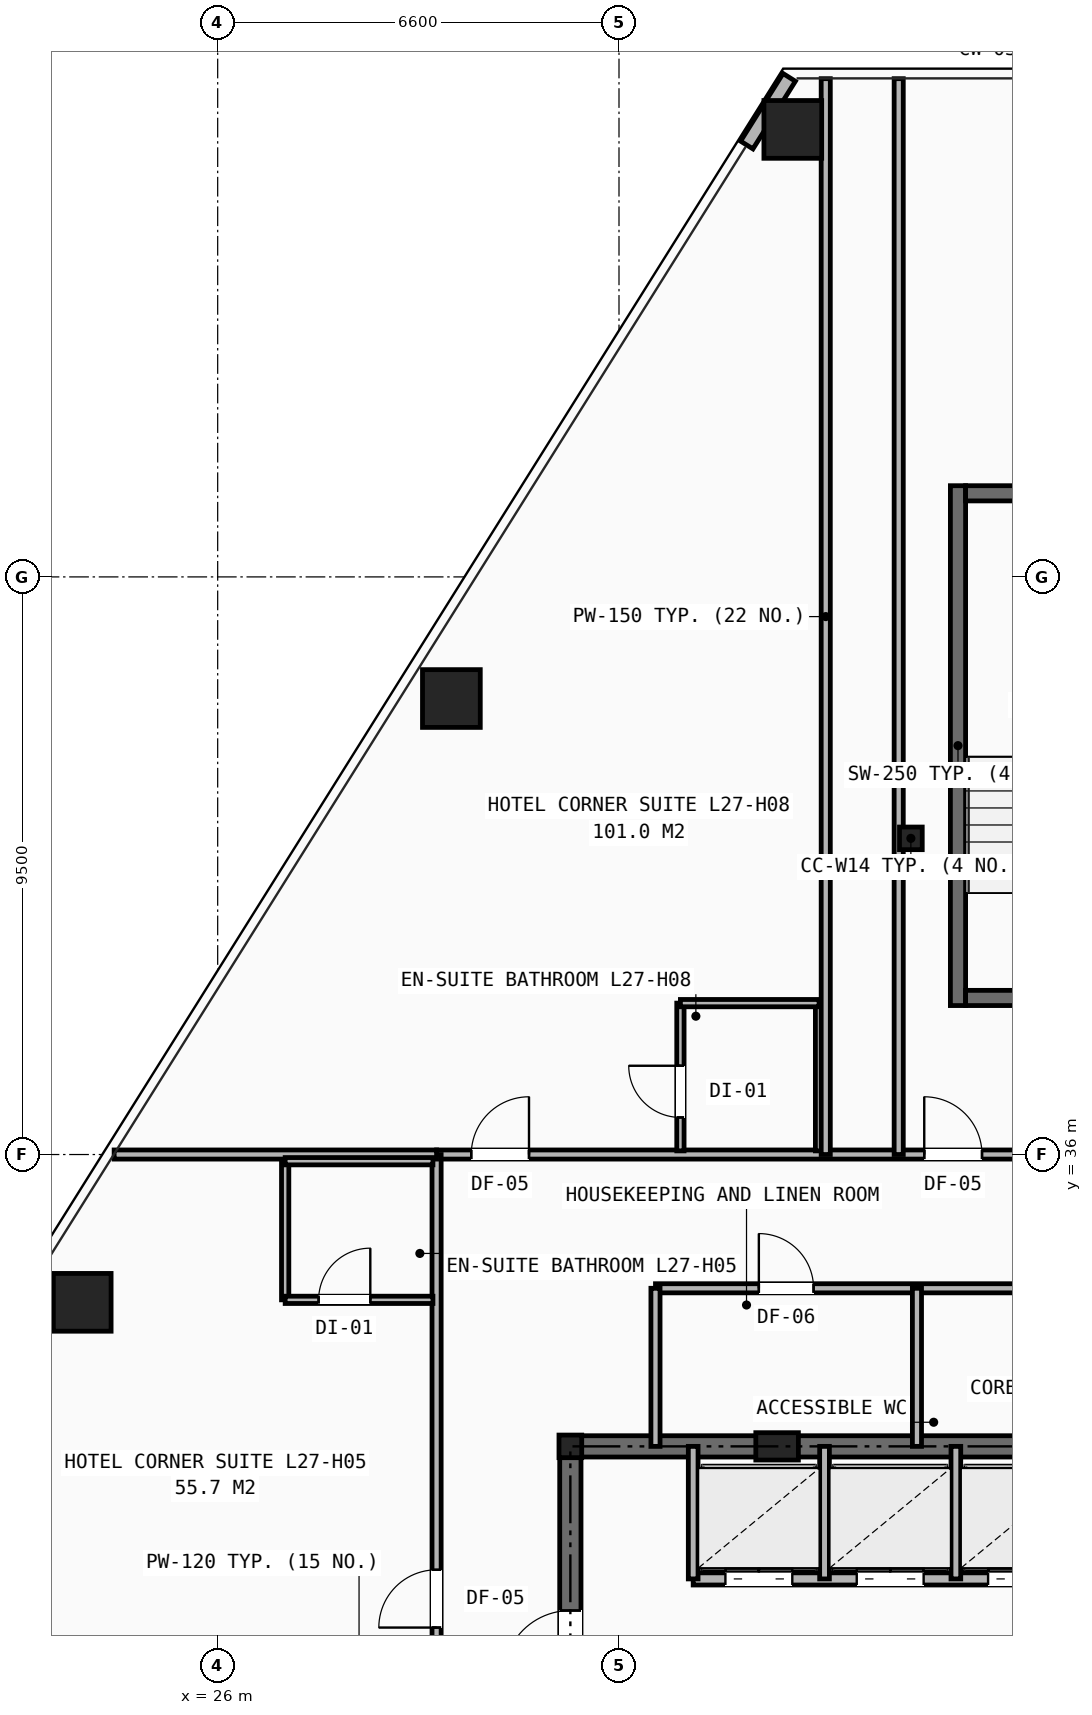
"""IFC4 building model, lengths in metres.
Left out: names, types, materials, properties, quantities, classifications, styles, units other than length and angle.
Written with IfcOpenShell. Run it as: python <this file> out.ifc"""

import sys

from ifc_helpers import new_model, si_unit, direction, frame, frame_2d, origin, origin_2d, place, context, subcontext, project, spatial, rectangle, hollow_rectangle, i_section, extrude, element, fill, save


model = new_model("IFC4")
c1 = context("Model", 3, precision=1e-05, world=origin(), true_north=direction((0.0, 1.0)))
c2 = subcontext(c1, "Body", "Model", "MODEL_VIEW")
j1 = project(units=[si_unit("LENGTHUNIT", "METRE"), si_unit("PLANEANGLEUNIT", "RADIAN")], contexts=[c1])
p1 = place(None, origin())
s1 = spatial("IfcSite", under=j1, at=p1, CompositionType="ELEMENT")
p2 = place(p1, origin())
s2 = spatial("IfcBuilding", under=s1, at=p2, CompositionType="ELEMENT")
p3 = place(p2, frame((0.0, 0.0, 95.8)))
s3 = spatial("IfcBuildingStorey", under=s2, at=p3, CompositionType="ELEMENT", Elevation=95.8)
for number, where, z_axis, x_axis in (
    (1, (31.8, 31.2, 0.0), (0.0, 0.0, 1.0), (1.0, 0.0, 0.0)),
    (2, (37.4, 41.2, 0.0), (0.0, 0.0, 1.0), (1.0, 0.0, 0.0)),
):
    element("IfcColumn", number, at=place(p3, frame(where, z_axis=z_axis, x_axis=x_axis)), inside=s3, PredefinedType="COLUMN", context=c2, shape_type="SweptSolid", body=[
        extrude(i_section(OverallWidth=0.374, OverallDepth=0.372, WebThickness=0.016, FlangeThickness=0.026, at=origin_2d()), origin(), (0.0, 0.0, 1.0), 3.2),
    ])
p4 = place(p3, frame((35.2, 31.2, 0.0), z_axis=(0.0, 0.0, 1.0), x_axis=(1.0, 0.0, 0.0)))
e3 = element("IfcColumn", 3, at=p4, inside=s3, PredefinedType="PILASTER", context=c2, shape_type="SweptSolid", body=[
    extrude(rectangle(XDim=0.7, YDim=0.45, at=origin_2d()), origin(), (0.0, 0.0, 1.0), 3.2),
])
for number, where, z_axis, x_axis in (
    (4, (35.458, 52.86, 0.0), (0.0, 0.0, 1.0), (1.0, 0.0, 0.0)),
    (5, (29.844, 43.5, 0.0), (0.0, 0.0, 1.0), (1.0, 0.0, 0.0)),
    (6, (23.772, 33.569, 0.0), (0.0, 0.0, 1.0), (1.0, 0.0, 0.0)),
):
    element("IfcColumn", number, at=place(p3, frame(where, z_axis=z_axis, x_axis=x_axis)), inside=s3, PredefinedType="COLUMN", context=c2, shape_type="SweptSolid", body=[
        extrude(hollow_rectangle(XDim=0.95, YDim=0.95, WallThickness=0.065, at=origin_2d()), origin(), (0.0, 0.0, 1.0), 3.2),
    ])
p5 = place(p3, frame((35.399, 53.716, 0.0), z_axis=(0.0, 0.0, 1.0), x_axis=(-0.531234768042, -0.847224658059, 0.0)))
e7 = element("IfcWall", 7, at=p5, inside=s3, PredefinedType="SHEAR", context=c2, shape_type="SweptSolid", body=[
    extrude(rectangle(XDim=1.313, YDim=0.24, at=frame_2d((0.657, 0.0))), origin(), (0.0, 0.0, 1.0), 2.253),
])
p6 = place(p3, frame((31.8, 31.2, 0.0), z_axis=(0.0, 0.0, 1.0), x_axis=(1.0, 0.0, 0.0)))
e8 = element("IfcWall", 8, at=p6, inside=s3, PredefinedType="SHEAR", context=c2, shape_type="SweptSolid", body=[
    extrude(rectangle(XDim=16.4, YDim=0.35, at=frame_2d((8.2, 0.0))), origin(), (0.0, 0.0, 1.0), 2.97),
])
p7 = place(p3, frame((31.8, 16.4, 0.0), z_axis=(0.0, 0.0, 1.0), x_axis=(0.0, 1.0, 0.0)))
e9 = element("IfcWall", 9, at=p7, inside=s3, PredefinedType="SHEAR", context=c2, shape_type="SweptSolid", body=[
    extrude(rectangle(XDim=14.8, YDim=0.35, at=frame_2d((7.4, 0.0))), origin(), (0.0, 0.0, 1.0), 2.97),
])
p8 = place(p7, frame((11.0, 0.0, 0.0)))
e10 = element("IfcOpeningElement", 10, at=p8, cuts=e9, PredefinedType="OPENING", context=c2, shape_type="SweptSolid", body=[
    extrude(rectangle(XDim=1.1, YDim=2.15, at=frame_2d((0.55, 1.075))), frame((0.0, 0.185, 0.0), z_axis=(0.0, -1.0, 0.0), x_axis=(1.0, 0.0, 0.0)), (0.0, 0.0, 1.0), 0.37),
])
p9 = place(p3, frame((33.82, 29.02, 0.0), z_axis=(0.0, 0.0, 1.0), x_axis=(1.0, 0.0, 0.0)))
e11 = element("IfcWall", 11, at=p9, inside=s3, PredefinedType="SOLIDWALL", context=c2, shape_type="SweptSolid", body=[
    extrude(rectangle(XDim=14.38, YDim=0.2, at=frame_2d((7.19, 0.0))), origin(), (0.0, 0.0, 1.0), 2.421),
])
p10 = place(p9, frame((0.53, 0.0, 0.0)))
e12 = element("IfcOpeningElement", 12, at=p10, cuts=e11, PredefinedType="OPENING", context=c2, shape_type="SweptSolid", body=[
    extrude(rectangle(XDim=1.1, YDim=2.15, at=frame_2d((0.55, 1.075))), frame((0.0, 0.11, 0.0), z_axis=(0.0, -1.0, 0.0), x_axis=(1.0, 0.0, 0.0)), (0.0, 0.0, 1.0), 0.22),
])
p11 = place(p9, frame((2.69, 0.0, 0.0)))
e13 = element("IfcOpeningElement", 13, at=p11, cuts=e11, PredefinedType="OPENING", context=c2, shape_type="SweptSolid", body=[
    extrude(rectangle(XDim=1.1, YDim=2.15, at=frame_2d((0.55, 1.075))), frame((0.0, 0.11, 0.0), z_axis=(0.0, -1.0, 0.0), x_axis=(1.0, 0.0, 0.0)), (0.0, 0.0, 1.0), 0.22),
])
p12 = place(p9, frame((4.85, 0.0, 0.0)))
e14 = element("IfcOpeningElement", 14, at=p12, cuts=e11, PredefinedType="OPENING", context=c2, shape_type="SweptSolid", body=[
    extrude(rectangle(XDim=1.1, YDim=2.15, at=frame_2d((0.55, 1.075))), frame((0.0, 0.11, 0.0), z_axis=(0.0, -1.0, 0.0), x_axis=(1.0, 0.0, 0.0)), (0.0, 0.0, 1.0), 0.22),
])
p13 = place(p9, frame((7.01, 0.0, 0.0)))
e15 = element("IfcOpeningElement", 15, at=p13, cuts=e11, PredefinedType="OPENING", context=c2, shape_type="SweptSolid", body=[
    extrude(rectangle(XDim=1.1, YDim=2.15, at=frame_2d((0.55, 1.075))), frame((0.0, 0.11, 0.0), z_axis=(0.0, -1.0, 0.0), x_axis=(1.0, 0.0, 0.0)), (0.0, 0.0, 1.0), 0.22),
])
for number, where, z_axis, x_axis in (
    (16, (33.82, 29.02, 0.0), (0.0, 0.0, 1.0), (0.0, 1.0, 0.0)),
    (17, (35.98, 29.02, 0.0), (0.0, 0.0, 1.0), (0.0, 1.0, 0.0)),
    (18, (38.14, 29.02, 0.0), (0.0, 0.0, 1.0), (0.0, 1.0, 0.0)),
):
    element("IfcWall", number, at=place(p3, frame(where, z_axis=z_axis, x_axis=x_axis)), inside=s3, PredefinedType="SOLIDWALL", context=c2, shape_type="SweptSolid", body=[
        extrude(rectangle(XDim=2.18, YDim=0.16, at=frame_2d((1.09, 0.0))), origin(), (0.0, 0.0, 1.0), 2.421),
    ])
p14 = place(p3, frame((33.2, 33.8, 0.0), z_axis=(0.0, 0.0, 1.0), x_axis=(1.0, 0.0, 0.0)))
e19 = element("IfcWall", 19, at=p14, inside=s3, PredefinedType="PARTITIONING", context=c2, shape_type="SweptSolid", body=[
    extrude(rectangle(XDim=13.0, YDim=0.15, at=frame_2d((6.5, 0.0))), origin(), (0.0, 0.0, 1.0), 2.97),
])
p15 = place(p14, frame((1.7, 0.0, 0.0)))
e20 = element("IfcOpeningElement", 20, at=p15, cuts=e19, PredefinedType="OPENING", context=c2, shape_type="SweptSolid", body=[
    extrude(rectangle(XDim=0.9, YDim=2.1, at=frame_2d((0.45, 1.05))), frame((0.0, 0.085, 0.0), z_axis=(0.0, -1.0, 0.0), x_axis=(1.0, 0.0, 0.0)), (0.0, 0.0, 1.0), 0.17),
])
p16 = place(p14, frame((6.0, 0.0, 0.0)))
e21 = element("IfcOpeningElement", 21, at=p16, cuts=e19, PredefinedType="OPENING", context=c2, shape_type="SweptSolid", body=[
    extrude(rectangle(XDim=0.9, YDim=2.1, at=frame_2d((0.45, 1.05))), frame((0.0, 0.085, 0.0), z_axis=(0.0, -1.0, 0.0), x_axis=(1.0, 0.0, 0.0)), (0.0, 0.0, 1.0), 0.17),
])
p17 = place(p14, frame((10.35, 0.0, 0.0)))
e22 = element("IfcOpeningElement", 22, at=p17, cuts=e19, PredefinedType="OPENING", context=c2, shape_type="SweptSolid", body=[
    extrude(rectangle(XDim=0.9, YDim=2.1, at=frame_2d((0.45, 1.05))), frame((0.0, 0.085, 0.0), z_axis=(0.0, -1.0, 0.0), x_axis=(1.0, 0.0, 0.0)), (0.0, 0.0, 1.0), 0.17),
])
for number, where, z_axis, x_axis in (
    (23, (33.2, 31.2, 0.0), (0.0, 0.0, 1.0), (0.0, 1.0, 0.0)),
    (24, (37.5, 31.2, 0.0), (0.0, 0.0, 1.0), (0.0, 1.0, 0.0)),
):
    element("IfcWall", number, at=place(p3, frame(where, z_axis=z_axis, x_axis=x_axis)), inside=s3, PredefinedType="PARTITIONING", context=c2, shape_type="SweptSolid", body=[
        extrude(rectangle(XDim=2.6, YDim=0.15, at=frame_2d((1.3, 0.0))), origin(), (0.0, 0.0, 1.0), 2.421),
    ])
p18 = place(p3, frame((29.6, 36.0, 0.0), z_axis=(0.0, 0.0, 1.0), x_axis=(1.0, 0.0, 0.0)))
e25 = element("IfcWall", 25, at=p18, inside=s3, PredefinedType="PARTITIONING", context=c2, shape_type="SweptSolid", body=[
    extrude(rectangle(XDim=9.65, YDim=0.15, at=frame_2d((4.825, 0.0))), origin(), (0.0, 0.0, 1.0), 2.503),
])
p19 = place(p18, frame((0.57, 0.0, 0.0)))
e26 = element("IfcOpeningElement", 26, at=p19, cuts=e25, PredefinedType="OPENING", context=c2, shape_type="SweptSolid", body=[
    extrude(rectangle(XDim=0.95, YDim=2.1, at=frame_2d((0.475, 1.05))), frame((0.0, 0.085, 0.0), z_axis=(0.0, -1.0, 0.0), x_axis=(1.0, 0.0, 0.0)), (0.0, 0.0, 1.0), 0.17),
])
p20 = place(p18, frame((8.02, 0.0, 0.0)))
e27 = element("IfcOpeningElement", 27, at=p20, cuts=e25, PredefinedType="OPENING", context=c2, shape_type="SweptSolid", body=[
    extrude(rectangle(XDim=0.95, YDim=2.1, at=frame_2d((0.475, 1.05))), frame((0.0, 0.085, 0.0), z_axis=(0.0, -1.0, 0.0), x_axis=(1.0, 0.0, 0.0)), (0.0, 0.0, 1.0), 0.17),
])
p21 = place(p3, frame((29.6, 14.1, 0.0), z_axis=(0.0, 0.0, 1.0), x_axis=(0.0, 1.0, 0.0)))
e28 = element("IfcWall", 28, at=p21, inside=s3, PredefinedType="PARTITIONING", context=c2, shape_type="SweptSolid", body=[
    extrude(rectangle(XDim=21.9, YDim=0.15, at=frame_2d((10.95, 0.0))), origin(), (0.0, 0.0, 1.0), 2.421),
])
p22 = place(p21, frame((0.42, 0.0, 0.0)))
e29 = element("IfcOpeningElement", 29, at=p22, cuts=e28, PredefinedType="OPENING", context=c2, shape_type="SweptSolid", body=[
    extrude(rectangle(XDim=0.95, YDim=2.1, at=frame_2d((0.475, 1.05))), frame((0.0, 0.085, 0.0), z_axis=(0.0, -1.0, 0.0), x_axis=(1.0, 0.0, 0.0)), (0.0, 0.0, 1.0), 0.17),
])
p23 = place(p21, frame((6.12, 0.0, 0.0)))
e30 = element("IfcOpeningElement", 30, at=p23, cuts=e28, PredefinedType="OPENING", context=c2, shape_type="SweptSolid", body=[
    extrude(rectangle(XDim=0.95, YDim=2.1, at=frame_2d((0.475, 1.05))), frame((0.0, 0.085, 0.0), z_axis=(0.0, -1.0, 0.0), x_axis=(1.0, 0.0, 0.0)), (0.0, 0.0, 1.0), 0.17),
])
p24 = place(p21, frame((14.12, 0.0, 0.0)))
e31 = element("IfcOpeningElement", 31, at=p24, cuts=e28, PredefinedType="OPENING", context=c2, shape_type="SweptSolid", body=[
    extrude(rectangle(XDim=0.95, YDim=2.1, at=frame_2d((0.475, 1.05))), frame((0.0, 0.085, 0.0), z_axis=(0.0, -1.0, 0.0), x_axis=(1.0, 0.0, 0.0)), (0.0, 0.0, 1.0), 0.17),
])
p25 = place(p3, frame((24.297, 36.0, 0.0), z_axis=(0.0, 0.0, 1.0), x_axis=(1.0, 0.0, 0.0)))
e32 = element("IfcWall", 32, at=p25, inside=s3, PredefinedType="PARTITIONING", context=c2, shape_type="SweptSolid", body=[
    extrude(rectangle(XDim=5.303, YDim=0.15, at=frame_2d((2.651, 0.0))), origin(), (0.0, 0.0, 1.0), 2.258),
])
p26 = place(p3, frame((27.11, 33.61, 0.0), z_axis=(0.0, 0.0, 1.0), x_axis=(0.0, 1.0, 0.0)))
e33 = element("IfcWall", 33, at=p26, inside=s3, PredefinedType="PARTITIONING", context=c2, shape_type="SweptSolid", body=[
    extrude(rectangle(XDim=2.28, YDim=0.12, at=frame_2d((1.14, 0.0))), origin(), (0.0, 0.0, 1.0), 2.97),
])
p27 = place(p3, frame((27.11, 33.61, 0.0), z_axis=(0.0, 0.0, 1.0), x_axis=(1.0, 0.0, 0.0)))
e34 = element("IfcWall", 34, at=p27, inside=s3, PredefinedType="PARTITIONING", context=c2, shape_type="SweptSolid", body=[
    extrude(rectangle(XDim=2.43, YDim=0.12, at=frame_2d((1.215, 0.0))), origin(), (0.0, 0.0, 1.0), 2.503),
])
p28 = place(p27, frame((0.55, 0.0, 0.0)))
e35 = element("IfcOpeningElement", 35, at=p28, cuts=e34, PredefinedType="OPENING", context=c2, shape_type="SweptSolid", body=[
    extrude(rectangle(XDim=0.85, YDim=2.05, at=frame_2d((0.425, 1.025))), frame((0.0, 0.07, 0.0), z_axis=(0.0, -1.0, 0.0), x_axis=(1.0, 0.0, 0.0)), (0.0, 0.0, 1.0), 0.14),
])
p29 = place(p3, frame((27.11, 35.89, 0.0), z_axis=(0.0, 0.0, 1.0), x_axis=(1.0, 0.0, 0.0)))
e36 = element("IfcWall", 36, at=p29, inside=s3, PredefinedType="PARTITIONING", context=c2, shape_type="SweptSolid", body=[
    extrude(rectangle(XDim=2.43, YDim=0.12, at=frame_2d((1.215, 0.0))), origin(), (0.0, 0.0, 1.0), 2.503),
])
p30 = place(p3, frame((33.61, 36.06, 0.0), z_axis=(0.0, 0.0, 1.0), x_axis=(0.0, 1.0, 0.0)))
e37 = element("IfcWall", 37, at=p30, inside=s3, PredefinedType="PARTITIONING", context=c2, shape_type="SweptSolid", body=[
    extrude(rectangle(XDim=2.43, YDim=0.12, at=frame_2d((1.215, 0.0))), origin(), (0.0, 0.0, 1.0), 2.97),
])
p31 = place(p30, frame((0.55, 0.0, 0.0)))
e38 = element("IfcOpeningElement", 38, at=p31, cuts=e37, PredefinedType="OPENING", context=c2, shape_type="SweptSolid", body=[
    extrude(rectangle(XDim=0.85, YDim=2.05, at=frame_2d((0.425, 1.025))), frame((0.0, 0.07, 0.0), z_axis=(0.0, -1.0, 0.0), x_axis=(1.0, 0.0, 0.0)), (0.0, 0.0, 1.0), 0.14),
])
p32 = place(p3, frame((35.89, 36.06, 0.0), z_axis=(0.0, 0.0, 1.0), x_axis=(0.0, 1.0, 0.0)))
e39 = element("IfcWall", 39, at=p32, inside=s3, PredefinedType="PARTITIONING", context=c2, shape_type="SweptSolid", body=[
    extrude(rectangle(XDim=2.43, YDim=0.12, at=frame_2d((1.215, 0.0))), origin(), (0.0, 0.0, 1.0), 2.97),
])
p33 = place(p3, frame((33.61, 38.49, 0.0), z_axis=(0.0, 0.0, 1.0), x_axis=(1.0, 0.0, 0.0)))
e40 = element("IfcWall", 40, at=p33, inside=s3, PredefinedType="PARTITIONING", context=c2, shape_type="SweptSolid", body=[
    extrude(rectangle(XDim=2.28, YDim=0.12, at=frame_2d((1.14, 0.0))), origin(), (0.0, 0.0, 1.0), 2.97),
])
for number, where, z_axis, x_axis in (
    (41, (36.0, 36.0, 0.0), (0.0, 0.0, 1.0), (0.0, 1.0, 0.0)),
    (42, (37.2, 36.0, 0.0), (0.0, 0.0, 1.0), (0.0, 1.0, 0.0)),
):
    element("IfcWall", number, at=place(p3, frame(where, z_axis=z_axis, x_axis=x_axis)), inside=s3, PredefinedType="PARTITIONING", context=c2, shape_type="SweptSolid", body=[
        extrude(rectangle(XDim=17.694, YDim=0.15, at=frame_2d((8.847, 0.0))), origin(), (0.0, 0.0, 1.0), 2.258),
    ])
p34 = place(p3, frame((38.175, 38.45, 0.0), z_axis=(0.0, 0.0, 1.0), x_axis=(0.0, 1.0, 0.0)))
e43 = element("IfcWall", 43, at=p34, inside=s3, PredefinedType="SHEAR", context=c2, shape_type="SweptSolid", body=[
    extrude(rectangle(XDim=8.55, YDim=0.25, at=frame_2d((4.275, 0.0))), origin(), (0.0, 0.0, 1.0), 2.97),
])
p35 = place(p3, frame((38.3, 38.575, 0.0), z_axis=(0.0, 0.0, 1.0), x_axis=(1.0, 0.0, 0.0)))
e44 = element("IfcWall", 44, at=p35, inside=s3, PredefinedType="SHEAR", context=c2, shape_type="SweptSolid", body=[
    extrude(rectangle(XDim=3.4, YDim=0.25, at=frame_2d((1.7, 0.0))), origin(), (0.0, 0.0, 1.0), 2.97),
])
p36 = place(p35, frame((1.225, 0.0, 0.0)))
e45 = element("IfcOpeningElement", 45, at=p36, cuts=e44, PredefinedType="OPENING", context=c2, shape_type="SweptSolid", body=[
    extrude(rectangle(XDim=0.95, YDim=2.1, at=frame_2d((0.475, 1.05))), frame((0.0, 0.135, 0.0), z_axis=(0.0, -1.0, 0.0), x_axis=(1.0, 0.0, 0.0)), (0.0, 0.0, 1.0), 0.27),
])
p37 = place(p3, frame((38.3, 46.875, 0.0), z_axis=(0.0, 0.0, 1.0), x_axis=(1.0, 0.0, 0.0)))
e46 = element("IfcWall", 46, at=p37, inside=s3, PredefinedType="SHEAR", context=c2, shape_type="SweptSolid", body=[
    extrude(rectangle(XDim=3.4, YDim=0.25, at=frame_2d((1.7, 0.0))), origin(), (0.0, 0.0, 1.0), 2.97),
])
p38 = place(p8, origin())
e47 = element("IfcDoor", 47, at=p38, inside=s3, OperationType="SINGLE_SWING_LEFT", PredefinedType="DOOR", context=c2, shape_type="SweptSolid", body=[
    extrude(rectangle(XDim=1.1, YDim=2.15, at=frame_2d((0.55, 1.075))), frame((0.0, 0.025, 0.0), z_axis=(0.0, -1.0, 0.0), x_axis=(1.0, 0.0, 0.0)), (0.0, 0.0, 1.0), 0.05),
])
fill(e10, e47)
p39 = place(p10, origin())
e48 = element("IfcDoor", 48, at=p39, inside=s3, OperationType="DOUBLE_DOOR_SLIDING", PredefinedType="DOOR", context=c2, shape_type="SweptSolid", body=[
    extrude(rectangle(XDim=1.1, YDim=2.15, at=frame_2d((0.55, 1.075))), frame((0.0, 0.025, 0.0), z_axis=(0.0, -1.0, 0.0), x_axis=(1.0, 0.0, 0.0)), (0.0, 0.0, 1.0), 0.05),
])
fill(e12, e48)
p40 = place(p11, origin())
e49 = element("IfcDoor", 49, at=p40, inside=s3, OperationType="DOUBLE_DOOR_SLIDING", PredefinedType="DOOR", context=c2, shape_type="SweptSolid", body=[
    extrude(rectangle(XDim=1.1, YDim=2.15, at=frame_2d((0.55, 1.075))), frame((0.0, 0.025, 0.0), z_axis=(0.0, -1.0, 0.0), x_axis=(1.0, 0.0, 0.0)), (0.0, 0.0, 1.0), 0.05),
])
fill(e13, e49)
p41 = place(p12, origin())
e50 = element("IfcDoor", 50, at=p41, inside=s3, OperationType="DOUBLE_DOOR_SLIDING", PredefinedType="DOOR", context=c2, shape_type="SweptSolid", body=[
    extrude(rectangle(XDim=1.1, YDim=2.15, at=frame_2d((0.55, 1.075))), frame((0.0, 0.025, 0.0), z_axis=(0.0, -1.0, 0.0), x_axis=(1.0, 0.0, 0.0)), (0.0, 0.0, 1.0), 0.05),
])
fill(e14, e50)
p42 = place(p15, origin())
e51 = element("IfcDoor", 51, at=p42, inside=s3, OperationType="SINGLE_SWING_LEFT", PredefinedType="DOOR", context=c2, shape_type="SweptSolid", body=[
    extrude(rectangle(XDim=0.9, YDim=2.1, at=frame_2d((0.45, 1.05))), frame((0.0, 0.025, 0.0), z_axis=(0.0, -1.0, 0.0), x_axis=(1.0, 0.0, 0.0)), (0.0, 0.0, 1.0), 0.05),
])
fill(e20, e51)
p43 = place(p24, origin())
e52 = element("IfcDoor", 52, at=p43, inside=s3, OperationType="SINGLE_SWING_LEFT", PredefinedType="DOOR", context=c2, shape_type="SweptSolid", body=[
    extrude(rectangle(XDim=0.95, YDim=2.1, at=frame_2d((0.475, 1.05))), frame((0.0, 0.025, 0.0), z_axis=(0.0, -1.0, 0.0), x_axis=(1.0, 0.0, 0.0)), (0.0, 0.0, 1.0), 0.05),
])
fill(e31, e52)
p44 = place(p28, origin())
e53 = element("IfcDoor", 53, at=p44, inside=s3, OperationType="SINGLE_SWING_RIGHT", PredefinedType="DOOR", context=c2, shape_type="SweptSolid", body=[
    extrude(rectangle(XDim=0.85, YDim=2.05, at=frame_2d((0.425, 1.025))), frame((0.0, 0.025, 0.0), z_axis=(0.0, -1.0, 0.0), x_axis=(1.0, 0.0, 0.0)), (0.0, 0.0, 1.0), 0.05),
])
fill(e35, e53)
p45 = place(p19, origin())
e54 = element("IfcDoor", 54, at=p45, inside=s3, OperationType="SINGLE_SWING_RIGHT", PredefinedType="DOOR", context=c2, shape_type="SweptSolid", body=[
    extrude(rectangle(XDim=0.95, YDim=2.1, at=frame_2d((0.475, 1.05))), frame((0.0, 0.025, 0.0), z_axis=(0.0, -1.0, 0.0), x_axis=(1.0, 0.0, 0.0)), (0.0, 0.0, 1.0), 0.05),
])
fill(e26, e54)
p46 = place(p31, origin())
e55 = element("IfcDoor", 55, at=p46, inside=s3, OperationType="SINGLE_SWING_RIGHT", PredefinedType="DOOR", context=c2, shape_type="SweptSolid", body=[
    extrude(rectangle(XDim=0.85, YDim=2.05, at=frame_2d((0.425, 1.025))), frame((0.0, 0.025, 0.0), z_axis=(0.0, -1.0, 0.0), x_axis=(1.0, 0.0, 0.0)), (0.0, 0.0, 1.0), 0.05),
])
fill(e38, e55)
p47 = place(p20, origin())
e56 = element("IfcDoor", 56, at=p47, inside=s3, OperationType="SINGLE_SWING_LEFT", PredefinedType="DOOR", context=c2, shape_type="SweptSolid", body=[
    extrude(rectangle(XDim=0.95, YDim=2.1, at=frame_2d((0.475, 1.05))), frame((0.0, 0.025, 0.0), z_axis=(0.0, -1.0, 0.0), x_axis=(1.0, 0.0, 0.0)), (0.0, 0.0, 1.0), 0.05),
])
fill(e27, e56)
save(model, sys.argv[1])
